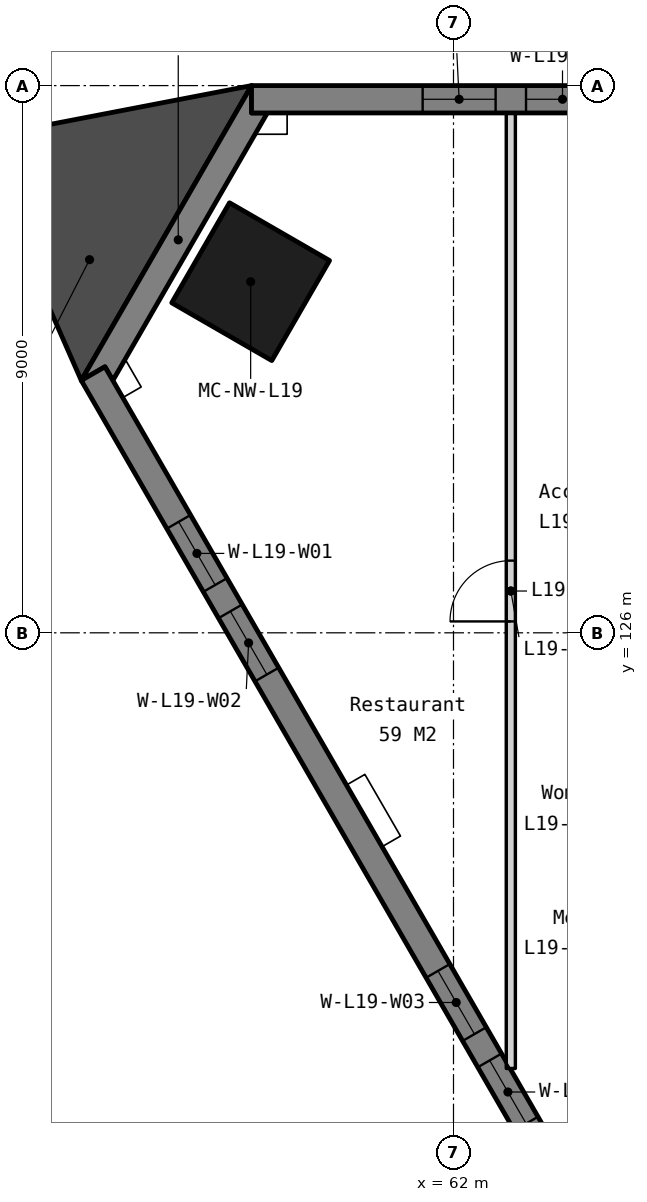
"""IFC4 building model, lengths in metres.
Left out: names, types, materials, properties, quantities, classifications, styles, units other than length and angle.
Written with IfcOpenShell. Run it as: python <this file> out.ifc"""

import sys

from ifc_helpers import new_model, si_unit, direction, frame, frame_2d, origin, origin_2d, place, context, subcontext, project, spatial, polyline, rectangle, outline, extrude, element, fill, save


model = new_model("IFC4")
c1 = context("Model", 3, precision=1e-05, world=origin(), true_north=direction((0.0, 1.0)))
c2 = subcontext(c1, "Body", "Model", "MODEL_VIEW")
j1 = project(units=[si_unit("LENGTHUNIT", "METRE"), si_unit("PLANEANGLEUNIT", "RADIAN")], contexts=[c1])
p1 = place(None, origin())
s1 = spatial("IfcSite", under=j1, at=p1, CompositionType="ELEMENT")
p2 = place(p1, origin())
s2 = spatial("IfcBuilding", under=s1, at=p2, CompositionType="ELEMENT")
p3 = place(p2, frame((0.0, 0.0, 81.8)))
s3 = spatial("IfcBuildingStorey", under=s2, at=p3, CompositionType="ELEMENT", Elevation=81.8)
p4 = place(p3, frame((58.664, 131.775, 0.0), z_axis=(0.0, 0.0, 1.0), x_axis=(-0.5, -0.866025403784, 0.0)))
e1 = element("IfcColumn", 1, at=p4, inside=s3, PredefinedType="COLUMN", context=c2, shape_type="SweptSolid", body=[
    extrude(rectangle(XDim=1.9, YDim=1.9, at=origin_2d()), origin(), (0.0, 0.0, 1.0), 3.5),
])
p5 = place(p3, frame((0.0, 0.0, -0.45)))
e2 = element("IfcWall", 2, at=p5, inside=s3, PredefinedType="SOLIDWALL", context=c2, shape_type="SweptSolid", body=[
    extrude(outline(polyline([(58.678, 135.0), (58.678, 134.55), (58.938, 134.55), (56.398, 130.15), (56.268, 130.375), (55.878, 130.15), (58.678, 135.0)])), origin(), (0.0, 0.0, 1.0), 3.8),
])
p6 = place(p3, frame((101.322, 134.775, -0.45), z_axis=(0.0, 0.0, 1.0), x_axis=(-1.0, 0.0, 0.0)))
e3 = element("IfcWall", 3, at=p6, inside=s3, PredefinedType="SOLIDWALL", context=c2, shape_type="SweptSolid", body=[
    extrude(outline(polyline([(42.643, 0.0), (42.643, 3.8), (0.0, 3.8), (0.0, 0.0), (42.643, 0.0)])), frame((0.0, 0.225, 0.0), z_axis=(0.0, -1.0, 0.0), x_axis=(1.0, 0.0, 0.0)), (0.0, 0.0, 1.0), 0.45),
])
p7 = place(p6, frame((2.814, 0.0, 1.35)))
e4 = element("IfcOpeningElement", 4, at=p7, cuts=e3, PredefinedType="OPENING", context=c2, shape_type="SweptSolid", body=[
    extrude(rectangle(XDim=1.2, YDim=1.5, at=frame_2d((0.6, 0.75))), frame((0.0, 0.235, 0.0), z_axis=(0.0, -1.0, 0.0), x_axis=(1.0, 0.0, 0.0)), (0.0, 0.0, 1.0), 0.47),
])
p8 = place(p6, frame((4.514, 0.0, 1.35)))
e5 = element("IfcOpeningElement", 5, at=p8, cuts=e3, PredefinedType="OPENING", context=c2, shape_type="SweptSolid", body=[
    extrude(rectangle(XDim=1.2, YDim=1.5, at=frame_2d((0.6, 0.75))), frame((0.0, 0.235, 0.0), z_axis=(0.0, -1.0, 0.0), x_axis=(1.0, 0.0, 0.0)), (0.0, 0.0, 1.0), 0.47),
])
p9 = place(p6, frame((11.343, 0.0, 1.35)))
e6 = element("IfcOpeningElement", 6, at=p9, cuts=e3, PredefinedType="OPENING", context=c2, shape_type="SweptSolid", body=[
    extrude(rectangle(XDim=1.2, YDim=1.5, at=frame_2d((0.6, 0.75))), frame((0.0, 0.235, 0.0), z_axis=(0.0, -1.0, 0.0), x_axis=(1.0, 0.0, 0.0)), (0.0, 0.0, 1.0), 0.47),
])
p10 = place(p6, frame((13.043, 0.0, 1.35)))
e7 = element("IfcOpeningElement", 7, at=p10, cuts=e3, PredefinedType="OPENING", context=c2, shape_type="SweptSolid", body=[
    extrude(rectangle(XDim=1.2, YDim=1.5, at=frame_2d((0.6, 0.75))), frame((0.0, 0.235, 0.0), z_axis=(0.0, -1.0, 0.0), x_axis=(1.0, 0.0, 0.0)), (0.0, 0.0, 1.0), 0.47),
])
p11 = place(p6, frame((19.872, 0.0, 1.35)))
e8 = element("IfcOpeningElement", 8, at=p11, cuts=e3, PredefinedType="OPENING", context=c2, shape_type="SweptSolid", body=[
    extrude(rectangle(XDim=1.2, YDim=1.5, at=frame_2d((0.6, 0.75))), frame((0.0, 0.235, 0.0), z_axis=(0.0, -1.0, 0.0), x_axis=(1.0, 0.0, 0.0)), (0.0, 0.0, 1.0), 0.47),
])
p12 = place(p6, frame((21.572, 0.0, 1.35)))
e9 = element("IfcOpeningElement", 9, at=p12, cuts=e3, PredefinedType="OPENING", context=c2, shape_type="SweptSolid", body=[
    extrude(rectangle(XDim=1.2, YDim=1.5, at=frame_2d((0.6, 0.75))), frame((0.0, 0.235, 0.0), z_axis=(0.0, -1.0, 0.0), x_axis=(1.0, 0.0, 0.0)), (0.0, 0.0, 1.0), 0.47),
])
p13 = place(p6, frame((28.4, 0.0, 1.35)))
e10 = element("IfcOpeningElement", 10, at=p13, cuts=e3, PredefinedType="OPENING", context=c2, shape_type="SweptSolid", body=[
    extrude(rectangle(XDim=1.2, YDim=1.5, at=frame_2d((0.6, 0.75))), frame((0.0, 0.235, 0.0), z_axis=(0.0, -1.0, 0.0), x_axis=(1.0, 0.0, 0.0)), (0.0, 0.0, 1.0), 0.47),
])
p14 = place(p6, frame((30.1, 0.0, 1.35)))
e11 = element("IfcOpeningElement", 11, at=p14, cuts=e3, PredefinedType="OPENING", context=c2, shape_type="SweptSolid", body=[
    extrude(rectangle(XDim=1.2, YDim=1.5, at=frame_2d((0.6, 0.75))), frame((0.0, 0.235, 0.0), z_axis=(0.0, -1.0, 0.0), x_axis=(1.0, 0.0, 0.0)), (0.0, 0.0, 1.0), 0.47),
])
p15 = place(p6, frame((36.929, 0.0, 1.35)))
e12 = element("IfcOpeningElement", 12, at=p15, cuts=e3, PredefinedType="OPENING", context=c2, shape_type="SweptSolid", body=[
    extrude(rectangle(XDim=1.2, YDim=1.5, at=frame_2d((0.6, 0.75))), frame((0.0, 0.235, 0.0), z_axis=(0.0, -1.0, 0.0), x_axis=(1.0, 0.0, 0.0)), (0.0, 0.0, 1.0), 0.47),
])
p16 = place(p6, frame((38.629, 0.0, 1.35)))
e13 = element("IfcOpeningElement", 13, at=p16, cuts=e3, PredefinedType="OPENING", context=c2, shape_type="SweptSolid", body=[
    extrude(rectangle(XDim=1.2, YDim=1.5, at=frame_2d((0.6, 0.75))), frame((0.0, 0.235, 0.0), z_axis=(0.0, -1.0, 0.0), x_axis=(1.0, 0.0, 0.0)), (0.0, 0.0, 1.0), 0.47),
])
p17 = place(p3, frame((56.073, 130.263, -0.45), z_axis=(0.0, 0.0, 1.0), x_axis=(0.500000478905, -0.866025127289, 0.0)))
e14 = element("IfcWall", 14, at=p17, inside=s3, PredefinedType="SOLIDWALL", context=c2, shape_type="SweptSolid", body=[
    extrude(outline(polyline([(42.643, 0.0), (42.643, 3.8), (0.0, 3.8), (0.0, 0.0), (42.643, 0.0)])), frame((0.0, 0.225, 0.0), z_axis=(0.0, -1.0, 0.0), x_axis=(1.0, 0.0, 0.0)), (0.0, 0.0, 1.0), 0.45),
])
p18 = place(p17, frame((2.814, 0.0, 1.35)))
e15 = element("IfcOpeningElement", 15, at=p18, cuts=e14, PredefinedType="OPENING", context=c2, shape_type="SweptSolid", body=[
    extrude(rectangle(XDim=1.2, YDim=1.5, at=frame_2d((0.6, 0.75))), frame((0.0, 0.235, 0.0), z_axis=(0.0, -1.0, 0.0), x_axis=(1.0, 0.0, 0.0)), (0.0, 0.0, 1.0), 0.47),
])
p19 = place(p17, frame((4.514, 0.0, 1.35)))
e16 = element("IfcOpeningElement", 16, at=p19, cuts=e14, PredefinedType="OPENING", context=c2, shape_type="SweptSolid", body=[
    extrude(rectangle(XDim=1.2, YDim=1.5, at=frame_2d((0.6, 0.75))), frame((0.0, 0.235, 0.0), z_axis=(0.0, -1.0, 0.0), x_axis=(1.0, 0.0, 0.0)), (0.0, 0.0, 1.0), 0.47),
])
p20 = place(p17, frame((11.343, 0.0, 1.35)))
e17 = element("IfcOpeningElement", 17, at=p20, cuts=e14, PredefinedType="OPENING", context=c2, shape_type="SweptSolid", body=[
    extrude(rectangle(XDim=1.2, YDim=1.5, at=frame_2d((0.6, 0.75))), frame((0.0, 0.235, 0.0), z_axis=(0.0, -1.0, 0.0), x_axis=(1.0, 0.0, 0.0)), (0.0, 0.0, 1.0), 0.47),
])
p21 = place(p17, frame((13.043, 0.0, 1.35)))
e18 = element("IfcOpeningElement", 18, at=p21, cuts=e14, PredefinedType="OPENING", context=c2, shape_type="SweptSolid", body=[
    extrude(rectangle(XDim=1.2, YDim=1.5, at=frame_2d((0.6, 0.75))), frame((0.0, 0.235, 0.0), z_axis=(0.0, -1.0, 0.0), x_axis=(1.0, 0.0, 0.0)), (0.0, 0.0, 1.0), 0.47),
])
p22 = place(p17, frame((19.872, 0.0, 1.35)))
e19 = element("IfcOpeningElement", 19, at=p22, cuts=e14, PredefinedType="OPENING", context=c2, shape_type="SweptSolid", body=[
    extrude(rectangle(XDim=1.2, YDim=1.5, at=frame_2d((0.6, 0.75))), frame((0.0, 0.235, 0.0), z_axis=(0.0, -1.0, 0.0), x_axis=(1.0, 0.0, 0.0)), (0.0, 0.0, 1.0), 0.47),
])
p23 = place(p17, frame((21.572, 0.0, 1.35)))
e20 = element("IfcOpeningElement", 20, at=p23, cuts=e14, PredefinedType="OPENING", context=c2, shape_type="SweptSolid", body=[
    extrude(rectangle(XDim=1.2, YDim=1.5, at=frame_2d((0.6, 0.75))), frame((0.0, 0.235, 0.0), z_axis=(0.0, -1.0, 0.0), x_axis=(1.0, 0.0, 0.0)), (0.0, 0.0, 1.0), 0.47),
])
p24 = place(p17, frame((28.4, 0.0, 1.35)))
e21 = element("IfcOpeningElement", 21, at=p24, cuts=e14, PredefinedType="OPENING", context=c2, shape_type="SweptSolid", body=[
    extrude(rectangle(XDim=1.2, YDim=1.5, at=frame_2d((0.6, 0.75))), frame((0.0, 0.235, 0.0), z_axis=(0.0, -1.0, 0.0), x_axis=(1.0, 0.0, 0.0)), (0.0, 0.0, 1.0), 0.47),
])
p25 = place(p17, frame((30.1, 0.0, 1.35)))
e22 = element("IfcOpeningElement", 22, at=p25, cuts=e14, PredefinedType="OPENING", context=c2, shape_type="SweptSolid", body=[
    extrude(rectangle(XDim=1.2, YDim=1.5, at=frame_2d((0.6, 0.75))), frame((0.0, 0.235, 0.0), z_axis=(0.0, -1.0, 0.0), x_axis=(1.0, 0.0, 0.0)), (0.0, 0.0, 1.0), 0.47),
])
p26 = place(p17, frame((36.929, 0.0, 1.35)))
e23 = element("IfcOpeningElement", 23, at=p26, cuts=e14, PredefinedType="OPENING", context=c2, shape_type="SweptSolid", body=[
    extrude(rectangle(XDim=1.2, YDim=1.5, at=frame_2d((0.6, 0.75))), frame((0.0, 0.235, 0.0), z_axis=(0.0, -1.0, 0.0), x_axis=(1.0, 0.0, 0.0)), (0.0, 0.0, 1.0), 0.47),
])
p27 = place(p17, frame((38.629, 0.0, 1.35)))
e24 = element("IfcOpeningElement", 24, at=p27, cuts=e14, PredefinedType="OPENING", context=c2, shape_type="SweptSolid", body=[
    extrude(rectangle(XDim=1.2, YDim=1.5, at=frame_2d((0.6, 0.75))), frame((0.0, 0.235, 0.0), z_axis=(0.0, -1.0, 0.0), x_axis=(1.0, 0.0, 0.0)), (0.0, 0.0, 1.0), 0.47),
])
p28 = place(p3, frame((0.0, 0.0, -0.45)))
e25 = element("IfcWall", 25, at=p28, inside=s3, PredefinedType="SOLIDWALL", context=c2, shape_type="SweptSolid", body=[
    extrude(outline(polyline([(58.678, 135.0), (54.129, 134.124), (55.878, 130.15), (58.678, 135.0)])), origin(), (0.0, 0.0, 1.0), 3.8),
])
p29 = place(p3, frame((62.943, 118.834, 0.0), z_axis=(0.0, 0.0, 1.0), x_axis=(0.0, 1.0, 0.0)))
e26 = element("IfcWall", 26, at=p29, inside=s3, PredefinedType="PARTITIONING", context=c2, shape_type="SweptSolid", body=[
    extrude(rectangle(XDim=15.706, YDim=0.15, at=frame_2d((7.853, 0.0))), origin(), (0.0, 0.0, 1.0), 3.35),
])
p30 = place(p29, frame((7.353, 0.0, 0.0)))
e27 = element("IfcOpeningElement", 27, at=p30, cuts=e26, PredefinedType="OPENING", context=c2, shape_type="SweptSolid", body=[
    extrude(rectangle(XDim=1.0, YDim=2.1, at=frame_2d((0.5, 1.05))), frame((0.0, 0.085, 0.0), z_axis=(0.0, -1.0, 0.0), x_axis=(1.0, 0.0, 0.0)), (0.0, 0.0, 1.0), 0.17),
])
p31 = place(p15, origin())
e28 = element("IfcWindow", 28, at=p31, inside=s3, PartitioningType="SINGLE_PANEL", PredefinedType="WINDOW", context=c2, shape_type="SweptSolid", body=[
    extrude(rectangle(XDim=1.2, YDim=1.5, at=frame_2d((0.6, 0.75))), frame((0.0, 0.03, 0.0), z_axis=(0.0, -1.0, 0.0), x_axis=(1.0, 0.0, 0.0)), (0.0, 0.0, 1.0), 0.06),
])
fill(e12, e28)
p32 = place(p16, origin())
e29 = element("IfcWindow", 29, at=p32, inside=s3, PartitioningType="SINGLE_PANEL", PredefinedType="WINDOW", context=c2, shape_type="SweptSolid", body=[
    extrude(rectangle(XDim=1.2, YDim=1.5, at=frame_2d((0.6, 0.75))), frame((0.0, 0.03, 0.0), z_axis=(0.0, -1.0, 0.0), x_axis=(1.0, 0.0, 0.0)), (0.0, 0.0, 1.0), 0.06),
])
fill(e13, e29)
p33 = place(p18, origin())
e30 = element("IfcWindow", 30, at=p33, inside=s3, PartitioningType="SINGLE_PANEL", PredefinedType="WINDOW", context=c2, shape_type="SweptSolid", body=[
    extrude(rectangle(XDim=1.2, YDim=1.5, at=frame_2d((0.6, 0.75))), frame((0.0, 0.03, 0.0), z_axis=(0.0, -1.0, 0.0), x_axis=(1.0, 0.0, 0.0)), (0.0, 0.0, 1.0), 0.06),
])
fill(e15, e30)
p34 = place(p19, origin())
e31 = element("IfcWindow", 31, at=p34, inside=s3, PartitioningType="SINGLE_PANEL", PredefinedType="WINDOW", context=c2, shape_type="SweptSolid", body=[
    extrude(rectangle(XDim=1.2, YDim=1.5, at=frame_2d((0.6, 0.75))), frame((0.0, 0.03, 0.0), z_axis=(0.0, -1.0, 0.0), x_axis=(1.0, 0.0, 0.0)), (0.0, 0.0, 1.0), 0.06),
])
fill(e16, e31)
p35 = place(p20, origin())
e32 = element("IfcWindow", 32, at=p35, inside=s3, PartitioningType="SINGLE_PANEL", PredefinedType="WINDOW", context=c2, shape_type="SweptSolid", body=[
    extrude(rectangle(XDim=1.2, YDim=1.5, at=frame_2d((0.6, 0.75))), frame((0.0, 0.03, 0.0), z_axis=(0.0, -1.0, 0.0), x_axis=(1.0, 0.0, 0.0)), (0.0, 0.0, 1.0), 0.06),
])
fill(e17, e32)
p36 = place(p21, origin())
e33 = element("IfcWindow", 33, at=p36, inside=s3, PartitioningType="SINGLE_PANEL", PredefinedType="WINDOW", context=c2, shape_type="SweptSolid", body=[
    extrude(rectangle(XDim=1.2, YDim=1.5, at=frame_2d((0.6, 0.75))), frame((0.0, 0.03, 0.0), z_axis=(0.0, -1.0, 0.0), x_axis=(1.0, 0.0, 0.0)), (0.0, 0.0, 1.0), 0.06),
])
fill(e18, e33)
p37 = place(p30, origin())
e34 = element("IfcDoor", 34, at=p37, inside=s3, OperationType="SINGLE_SWING_LEFT", PredefinedType="DOOR", context=c2, shape_type="SweptSolid", body=[
    extrude(rectangle(XDim=1.0, YDim=2.1, at=frame_2d((0.5, 1.05))), frame((0.0, 0.025, 0.0), z_axis=(0.0, -1.0, 0.0), x_axis=(1.0, 0.0, 0.0)), (0.0, 0.0, 1.0), 0.05),
])
fill(e27, e34)
save(model, sys.argv[1])
